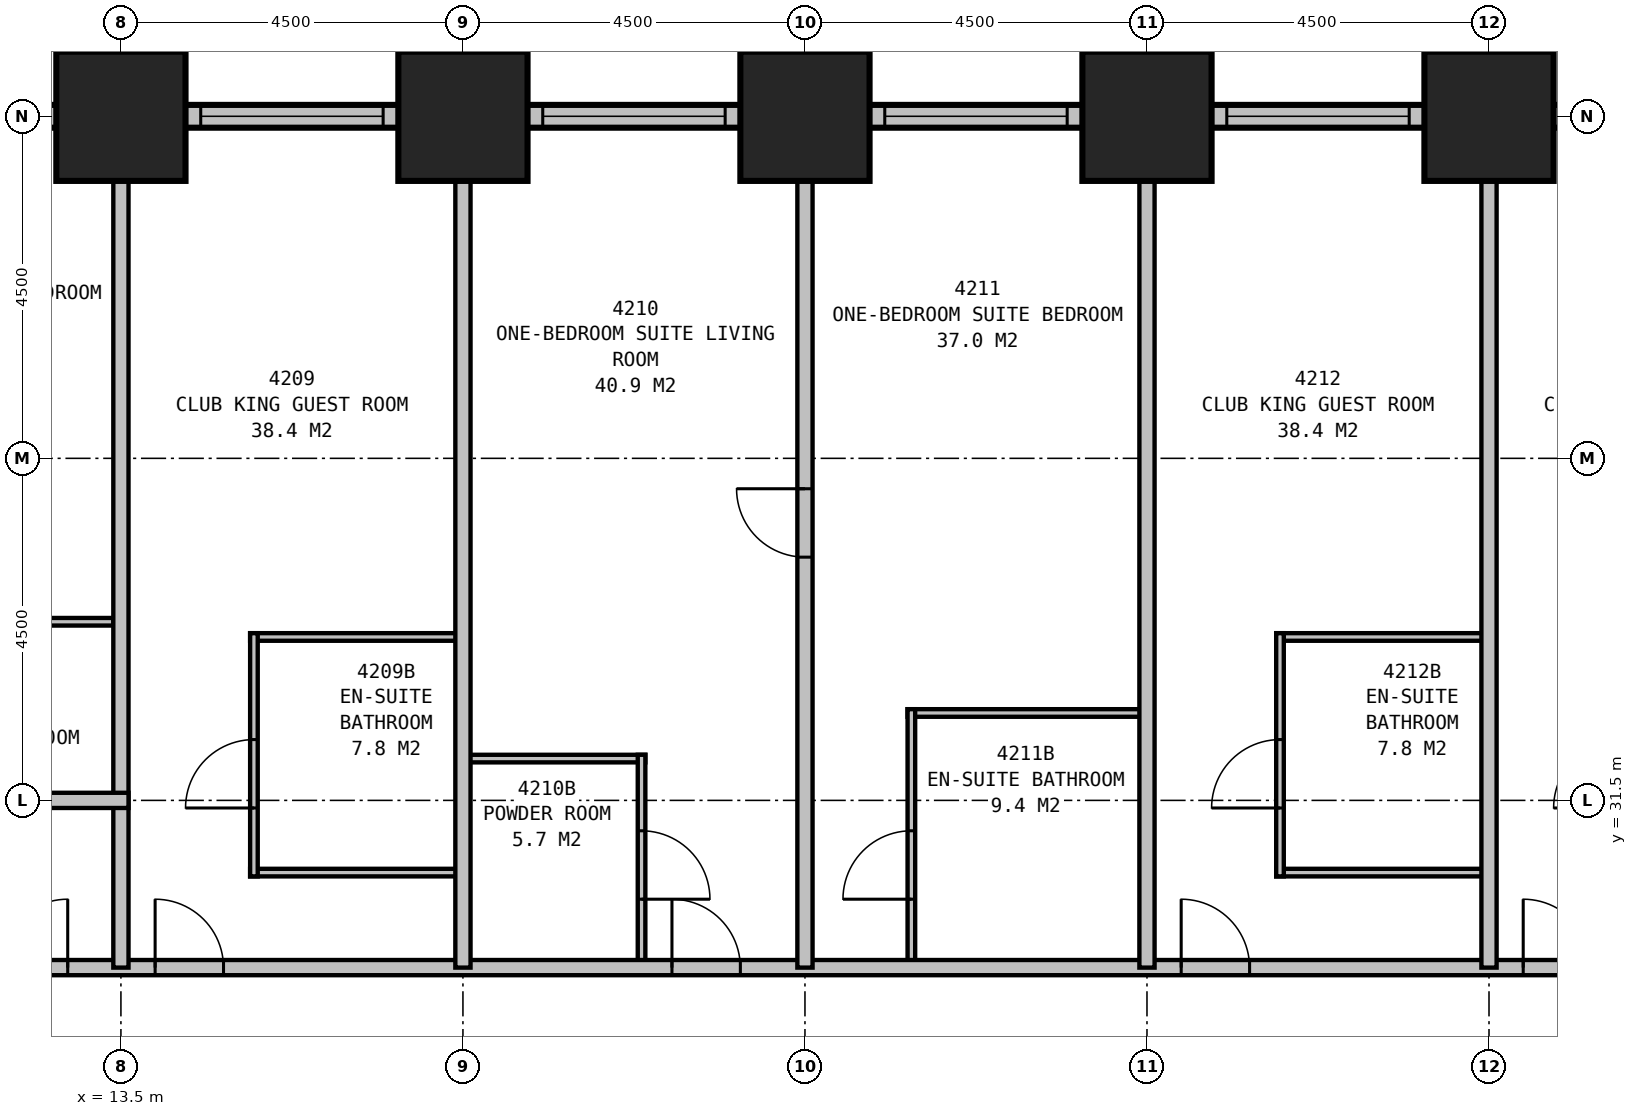
"""IFC4 building model, lengths in metres.
Left out: names, types, materials, properties, quantities, classifications, styles, units other than length and angle.
Written with IfcOpenShell. Run it as: python <this file> out.ifc"""

import sys

from ifc_helpers import new_model, si_unit, direction, frame, frame_2d, origin, origin_2d, place, context, subcontext, project, spatial, rectangle, extrude, element, fill, save


model = new_model("IFC4")
c1 = context("Model", 3, precision=1e-05, world=origin(), true_north=direction((0.0, 1.0)))
c2 = subcontext(c1, "Body", "Model", "MODEL_VIEW")
j1 = project(units=[si_unit("LENGTHUNIT", "METRE"), si_unit("PLANEANGLEUNIT", "RADIAN")], contexts=[c1])
p1 = place(None, origin())
s1 = spatial("IfcSite", under=j1, at=p1, CompositionType="ELEMENT")
p2 = place(p1, origin())
s2 = spatial("IfcBuilding", under=s1, at=p2, CompositionType="ELEMENT")
p3 = place(p2, frame((0.0, 0.0, 165.9)))
s3 = spatial("IfcBuildingStorey", under=s2, at=p3, CompositionType="ELEMENT", Elevation=165.9)
for number, where, z_axis, x_axis in (
    (1, (31.5, 40.5, 0.0), (0.0, 0.0, 1.0), (1.0, 0.0, 0.0)),
    (2, (27.0, 40.5, 0.0), (0.0, 0.0, 1.0), (1.0, 0.0, 0.0)),
    (3, (22.5, 40.5, 0.0), (0.0, 0.0, 1.0), (1.0, 0.0, 0.0)),
    (4, (18.0, 40.5, 0.0), (0.0, 0.0, 1.0), (1.0, 0.0, 0.0)),
    (5, (13.5, 40.5, 0.0), (0.0, 0.0, 1.0), (1.0, 0.0, 0.0)),
):
    element("IfcColumn", number, at=place(p3, frame(where, z_axis=z_axis, x_axis=x_axis)), inside=s3, PredefinedType="COLUMN", context=c2, shape_type="SweptSolid", body=[
        extrude(rectangle(XDim=1.7, YDim=1.7, at=origin_2d()), origin(), (0.0, 0.0, 1.0), 3.5),
    ])
p4 = place(p3, frame((40.65, 40.5, 0.0), z_axis=(0.0, 0.0, 1.0), x_axis=(-1.0, 0.0, 0.0)))
e6 = element("IfcWall", 6, at=p4, inside=s3, PredefinedType="STANDARD", context=c2, shape_type="SweptSolid", body=[
    extrude(rectangle(XDim=31.8, YDim=0.3, at=frame_2d((15.9, 0.0))), origin(), (0.0, 0.0, 1.0), 2.25),
])
p5 = place(p4, frame((1.2, 0.0, 0.5)))
e7 = element("IfcOpeningElement", 7, at=p5, cuts=e6, PredefinedType="OPENING", context=c2, shape_type="SweptSolid", body=[
    extrude(rectangle(XDim=2.4, YDim=1.6, at=frame_2d((1.2, 0.8))), frame((0.0, 0.16, 0.0), z_axis=(0.0, -1.0, 0.0), x_axis=(1.0, 0.0, 0.0)), (0.0, 0.0, 1.0), 0.32),
])
p6 = place(p4, frame((5.7, 0.0, 0.5)))
e8 = element("IfcOpeningElement", 8, at=p6, cuts=e6, PredefinedType="OPENING", context=c2, shape_type="SweptSolid", body=[
    extrude(rectangle(XDim=2.4, YDim=1.6, at=frame_2d((1.2, 0.8))), frame((0.0, 0.16, 0.0), z_axis=(0.0, -1.0, 0.0), x_axis=(1.0, 0.0, 0.0)), (0.0, 0.0, 1.0), 0.32),
])
p7 = place(p4, frame((10.2, 0.0, 0.5)))
e9 = element("IfcOpeningElement", 9, at=p7, cuts=e6, PredefinedType="OPENING", context=c2, shape_type="SweptSolid", body=[
    extrude(rectangle(XDim=2.4, YDim=1.6, at=frame_2d((1.2, 0.8))), frame((0.0, 0.16, 0.0), z_axis=(0.0, -1.0, 0.0), x_axis=(1.0, 0.0, 0.0)), (0.0, 0.0, 1.0), 0.32),
])
p8 = place(p4, frame((14.7, 0.0, 0.5)))
e10 = element("IfcOpeningElement", 10, at=p8, cuts=e6, PredefinedType="OPENING", context=c2, shape_type="SweptSolid", body=[
    extrude(rectangle(XDim=2.4, YDim=1.6, at=frame_2d((1.2, 0.8))), frame((0.0, 0.16, 0.0), z_axis=(0.0, -1.0, 0.0), x_axis=(1.0, 0.0, 0.0)), (0.0, 0.0, 1.0), 0.32),
])
p9 = place(p4, frame((19.2, 0.0, 0.5)))
e11 = element("IfcOpeningElement", 11, at=p9, cuts=e6, PredefinedType="OPENING", context=c2, shape_type="SweptSolid", body=[
    extrude(rectangle(XDim=2.4, YDim=1.6, at=frame_2d((1.2, 0.8))), frame((0.0, 0.16, 0.0), z_axis=(0.0, -1.0, 0.0), x_axis=(1.0, 0.0, 0.0)), (0.0, 0.0, 1.0), 0.32),
])
p10 = place(p4, frame((23.7, 0.0, 0.5)))
e12 = element("IfcOpeningElement", 12, at=p10, cuts=e6, PredefinedType="OPENING", context=c2, shape_type="SweptSolid", body=[
    extrude(rectangle(XDim=2.4, YDim=1.6, at=frame_2d((1.2, 0.8))), frame((0.0, 0.16, 0.0), z_axis=(0.0, -1.0, 0.0), x_axis=(1.0, 0.0, 0.0)), (0.0, 0.0, 1.0), 0.32),
])
p11 = place(p4, frame((28.2, 0.0, 0.5)))
e13 = element("IfcOpeningElement", 13, at=p11, cuts=e6, PredefinedType="OPENING", context=c2, shape_type="SweptSolid", body=[
    extrude(rectangle(XDim=2.4, YDim=1.6, at=frame_2d((1.2, 0.8))), frame((0.0, 0.16, 0.0), z_axis=(0.0, -1.0, 0.0), x_axis=(1.0, 0.0, 0.0)), (0.0, 0.0, 1.0), 0.32),
])
p12 = place(p3, frame((11.2, 29.3, 0.0), z_axis=(0.0, 0.0, 1.0), x_axis=(1.0, 0.0, 0.0)))
e14 = element("IfcWall", 14, at=p12, inside=s3, PredefinedType="PARTITIONING", context=c2, shape_type="SweptSolid", body=[
    extrude(rectangle(XDim=27.1, YDim=0.2, at=frame_2d((13.55, 0.0))), origin(), (0.0, 0.0, 1.0), 3.25),
])
p13 = place(p12, frame((2.75, 0.0, 0.0)))
e15 = element("IfcOpeningElement", 15, at=p13, cuts=e14, PredefinedType="OPENING", context=c2, shape_type="SweptSolid", body=[
    extrude(rectangle(XDim=0.9, YDim=2.1, at=frame_2d((0.45, 1.05))), frame((0.0, 0.11, 0.0), z_axis=(0.0, -1.0, 0.0), x_axis=(1.0, 0.0, 0.0)), (0.0, 0.0, 1.0), 0.22),
])
p14 = place(p12, frame((9.55, 0.0, 0.0)))
e16 = element("IfcOpeningElement", 16, at=p14, cuts=e14, PredefinedType="OPENING", context=c2, shape_type="SweptSolid", body=[
    extrude(rectangle(XDim=0.9, YDim=2.1, at=frame_2d((0.45, 1.05))), frame((0.0, 0.11, 0.0), z_axis=(0.0, -1.0, 0.0), x_axis=(1.0, 0.0, 0.0)), (0.0, 0.0, 1.0), 0.22),
])
p15 = place(p12, frame((16.25, 0.0, 0.0)))
e17 = element("IfcOpeningElement", 17, at=p15, cuts=e14, PredefinedType="OPENING", context=c2, shape_type="SweptSolid", body=[
    extrude(rectangle(XDim=0.9, YDim=2.1, at=frame_2d((0.45, 1.05))), frame((0.0, 0.11, 0.0), z_axis=(0.0, -1.0, 0.0), x_axis=(1.0, 0.0, 0.0)), (0.0, 0.0, 1.0), 0.22),
])
p16 = place(p12, frame((20.75, 0.0, 0.0)))
e18 = element("IfcOpeningElement", 18, at=p16, cuts=e14, PredefinedType="OPENING", context=c2, shape_type="SweptSolid", body=[
    extrude(rectangle(XDim=0.9, YDim=2.1, at=frame_2d((0.45, 1.05))), frame((0.0, 0.11, 0.0), z_axis=(0.0, -1.0, 0.0), x_axis=(1.0, 0.0, 0.0)), (0.0, 0.0, 1.0), 0.22),
])
p17 = place(p12, frame((25.5, 0.0, 0.0)))
e19 = element("IfcOpeningElement", 19, at=p17, cuts=e14, PredefinedType="OPENING", context=c2, shape_type="SweptSolid", body=[
    extrude(rectangle(XDim=0.9, YDim=2.1, at=frame_2d((0.45, 1.05))), frame((0.0, 0.11, 0.0), z_axis=(0.0, -1.0, 0.0), x_axis=(1.0, 0.0, 0.0)), (0.0, 0.0, 1.0), 0.22),
])
p18 = place(p12, frame((0.7, 0.0, 0.0)))
e20 = element("IfcOpeningElement", 20, at=p18, cuts=e14, PredefinedType="OPENING", context=c2, shape_type="SweptSolid", body=[
    extrude(rectangle(XDim=0.9, YDim=2.1, at=frame_2d((0.45, 1.05))), frame((0.0, 0.11, 0.0), z_axis=(0.0, -1.0, 0.0), x_axis=(1.0, 0.0, 0.0)), (0.0, 0.0, 1.0), 0.22),
])
p19 = place(p3, frame((18.0, 29.3, 0.0), z_axis=(0.0, 0.0, 1.0), x_axis=(0.0, 1.0, 0.0)))
e21 = element("IfcWall", 21, at=p19, inside=s3, PredefinedType="PARTITIONING", context=c2, shape_type="SweptSolid", body=[
    extrude(rectangle(XDim=11.2, YDim=0.2, at=frame_2d((5.6, 0.0))), origin(), (0.0, 0.0, 1.0), 2.25),
])
p20 = place(p3, frame((22.5, 29.3, 0.0), z_axis=(0.0, 0.0, 1.0), x_axis=(0.0, 1.0, 0.0)))
e22 = element("IfcWall", 22, at=p20, inside=s3, PredefinedType="PARTITIONING", context=c2, shape_type="SweptSolid", body=[
    extrude(rectangle(XDim=11.2, YDim=0.2, at=frame_2d((5.6, 0.0))), origin(), (0.0, 0.0, 1.0), 2.25),
])
p21 = place(p20, frame((5.4, 0.0, 0.0)))
e23 = element("IfcOpeningElement", 23, at=p21, cuts=e22, PredefinedType="OPENING", context=c2, shape_type="SweptSolid", body=[
    extrude(rectangle(XDim=0.9, YDim=2.1, at=frame_2d((0.45, 1.05))), frame((0.0, 0.11, 0.0), z_axis=(0.0, -1.0, 0.0), x_axis=(1.0, 0.0, 0.0)), (0.0, 0.0, 1.0), 0.22),
])
for number, where, z_axis, x_axis in (
    (24, (27.0, 29.3, 0.0), (0.0, 0.0, 1.0), (0.0, 1.0, 0.0)),
    (25, (31.5, 29.3, 0.0), (0.0, 0.0, 1.0), (0.0, 1.0, 0.0)),
):
    element("IfcWall", number, at=place(p3, frame(where, z_axis=z_axis, x_axis=x_axis)), inside=s3, PredefinedType="PARTITIONING", context=c2, shape_type="SweptSolid", body=[
        extrude(rectangle(XDim=11.2, YDim=0.2, at=frame_2d((5.6, 0.0))), origin(), (0.0, 0.0, 1.0), 2.25),
    ])
for number, where, z_axis, x_axis in (
    (26, (15.2, 30.55, 0.0), (0.0, 0.0, 1.0), (1.0, 0.0, 0.0)),
    (27, (15.2, 33.65, 0.0), (0.0, 0.0, 1.0), (1.0, 0.0, 0.0)),
):
    element("IfcWall", number, at=place(p3, frame(where, z_axis=z_axis, x_axis=x_axis)), inside=s3, PredefinedType="PLUMBINGWALL", context=c2, shape_type="SweptSolid", body=[
        extrude(rectangle(XDim=2.8, YDim=0.1, at=frame_2d((1.4, 0.0))), origin(), (0.0, 0.0, 1.0), 3.25),
    ])
p22 = place(p3, frame((15.25, 30.5, 0.0), z_axis=(0.0, 0.0, 1.0), x_axis=(0.0, 1.0, 0.0)))
e28 = element("IfcWall", 28, at=p22, inside=s3, PredefinedType="PLUMBINGWALL", context=c2, shape_type="SweptSolid", body=[
    extrude(rectangle(XDim=3.2, YDim=0.1, at=frame_2d((1.6, 0.0))), origin(), (0.0, 0.0, 1.0), 3.25),
])
p23 = place(p22, frame((0.9, 0.0, 0.0)))
e29 = element("IfcOpeningElement", 29, at=p23, cuts=e28, PredefinedType="OPENING", context=c2, shape_type="SweptSolid", body=[
    extrude(rectangle(XDim=0.9, YDim=2.1, at=frame_2d((0.45, 1.05))), frame((0.0, 0.06, 0.0), z_axis=(0.0, -1.0, 0.0), x_axis=(1.0, 0.0, 0.0)), (0.0, 0.0, 1.0), 0.12),
])
p24 = place(p3, frame((18.0, 32.05, 0.0), z_axis=(0.0, 0.0, 1.0), x_axis=(1.0, 0.0, 0.0)))
e30 = element("IfcWall", 30, at=p24, inside=s3, PredefinedType="PLUMBINGWALL", context=c2, shape_type="SweptSolid", body=[
    extrude(rectangle(XDim=2.4, YDim=0.1, at=frame_2d((1.2, 0.0))), origin(), (0.0, 0.0, 1.0), 3.25),
])
p25 = place(p3, frame((20.35, 29.3, 0.0), z_axis=(0.0, 0.0, 1.0), x_axis=(0.0, 1.0, 0.0)))
e31 = element("IfcWall", 31, at=p25, inside=s3, PredefinedType="PLUMBINGWALL", context=c2, shape_type="SweptSolid", body=[
    extrude(rectangle(XDim=2.8, YDim=0.1, at=frame_2d((1.4, 0.0))), origin(), (0.0, 0.0, 1.0), 3.25),
])
p26 = place(p25, frame((1.8, 0.0, 0.0), z_axis=(0.0, 0.0, 1.0), x_axis=(-1.0, 0.0, 0.0)))
e32 = element("IfcOpeningElement", 32, at=p26, cuts=e31, PredefinedType="OPENING", context=c2, shape_type="SweptSolid", body=[
    extrude(rectangle(XDim=0.9, YDim=2.1, at=frame_2d((0.45, 1.05))), frame((0.0, 0.06, 0.0), z_axis=(0.0, -1.0, 0.0), x_axis=(1.0, 0.0, 0.0)), (0.0, 0.0, 1.0), 0.12),
])
p27 = place(p3, frame((23.85, 32.65, 0.0), z_axis=(0.0, 0.0, 1.0), x_axis=(1.0, 0.0, 0.0)))
e33 = element("IfcWall", 33, at=p27, inside=s3, PredefinedType="PLUMBINGWALL", context=c2, shape_type="SweptSolid", body=[
    extrude(rectangle(XDim=3.15, YDim=0.1, at=frame_2d((1.575, 0.0))), origin(), (0.0, 0.0, 1.0), 3.25),
])
p28 = place(p3, frame((23.9, 29.3, 0.0), z_axis=(0.0, 0.0, 1.0), x_axis=(0.0, 1.0, 0.0)))
e34 = element("IfcWall", 34, at=p28, inside=s3, PredefinedType="PLUMBINGWALL", context=c2, shape_type="SweptSolid", body=[
    extrude(rectangle(XDim=3.4, YDim=0.1, at=frame_2d((1.7, 0.0))), origin(), (0.0, 0.0, 1.0), 3.25),
])
p29 = place(p28, frame((0.9, 0.0, 0.0)))
e35 = element("IfcOpeningElement", 35, at=p29, cuts=e34, PredefinedType="OPENING", context=c2, shape_type="SweptSolid", body=[
    extrude(rectangle(XDim=0.9, YDim=2.1, at=frame_2d((0.45, 1.05))), frame((0.0, 0.06, 0.0), z_axis=(0.0, -1.0, 0.0), x_axis=(1.0, 0.0, 0.0)), (0.0, 0.0, 1.0), 0.12),
])
for number, where, z_axis, x_axis in (
    (36, (28.7, 30.55, 0.0), (0.0, 0.0, 1.0), (1.0, 0.0, 0.0)),
    (37, (28.7, 33.65, 0.0), (0.0, 0.0, 1.0), (1.0, 0.0, 0.0)),
):
    element("IfcWall", number, at=place(p3, frame(where, z_axis=z_axis, x_axis=x_axis)), inside=s3, PredefinedType="PLUMBINGWALL", context=c2, shape_type="SweptSolid", body=[
        extrude(rectangle(XDim=2.8, YDim=0.1, at=frame_2d((1.4, 0.0))), origin(), (0.0, 0.0, 1.0), 3.25),
    ])
p30 = place(p3, frame((28.75, 30.5, 0.0), z_axis=(0.0, 0.0, 1.0), x_axis=(0.0, 1.0, 0.0)))
e38 = element("IfcWall", 38, at=p30, inside=s3, PredefinedType="PLUMBINGWALL", context=c2, shape_type="SweptSolid", body=[
    extrude(rectangle(XDim=3.2, YDim=0.1, at=frame_2d((1.6, 0.0))), origin(), (0.0, 0.0, 1.0), 3.25),
])
p31 = place(p30, frame((0.9, 0.0, 0.0)))
e39 = element("IfcOpeningElement", 39, at=p31, cuts=e38, PredefinedType="OPENING", context=c2, shape_type="SweptSolid", body=[
    extrude(rectangle(XDim=0.9, YDim=2.1, at=frame_2d((0.45, 1.05))), frame((0.0, 0.06, 0.0), z_axis=(0.0, -1.0, 0.0), x_axis=(1.0, 0.0, 0.0)), (0.0, 0.0, 1.0), 0.12),
])
p32 = place(p3, frame((13.5, 29.3, 0.0), z_axis=(0.0, 0.0, 1.0), x_axis=(0.0, 1.0, 0.0)))
e40 = element("IfcWall", 40, at=p32, inside=s3, PredefinedType="PARTITIONING", context=c2, shape_type="SweptSolid", body=[
    extrude(rectangle(XDim=11.2, YDim=0.2, at=frame_2d((5.6, 0.0))), origin(), (0.0, 0.0, 1.0), 2.25),
])
p33 = place(p3, frame((13.6, 31.5, 0.0), z_axis=(0.0, 0.0, 1.0), x_axis=(-1.0, 0.0, 0.0)))
e41 = element("IfcWall", 41, at=p33, inside=s3, PredefinedType="PARTITIONING", context=c2, shape_type="SweptSolid", body=[
    extrude(rectangle(XDim=10.099, YDim=0.2, at=frame_2d((5.05, 0.0))), origin(), (0.0, 0.0, 1.0), 3.25),
])
p34 = place(p33, frame((8.999, 0.0, 0.0), z_axis=(0.0, 0.0, 1.0), x_axis=(-1.0, 0.0, 0.0)))
e42 = element("IfcOpeningElement", 42, at=p34, cuts=e41, PredefinedType="OPENING", context=c2, shape_type="SweptSolid", body=[
    extrude(rectangle(XDim=0.9, YDim=2.1, at=frame_2d((0.45, 1.05))), frame((0.0, 0.11, 0.0), z_axis=(0.0, -1.0, 0.0), x_axis=(1.0, 0.0, 0.0)), (0.0, 0.0, 1.0), 0.22),
])
p35 = place(p3, frame((13.4, 33.85, 0.0), z_axis=(0.0, 0.0, 1.0), x_axis=(-1.0, 0.0, 0.0)))
e43 = element("IfcWall", 43, at=p35, inside=s3, PredefinedType="PLUMBINGWALL", context=c2, shape_type="SweptSolid", body=[
    extrude(rectangle(XDim=3.3, YDim=0.1, at=frame_2d((1.65, 0.0))), origin(), (0.0, 0.0, 1.0), 3.25),
])
p36 = place(p35, frame((1.8, 0.0, 0.0), z_axis=(0.0, 0.0, 1.0), x_axis=(-1.0, 0.0, 0.0)))
e44 = element("IfcOpeningElement", 44, at=p36, cuts=e43, PredefinedType="OPENING", context=c2, shape_type="SweptSolid", body=[
    extrude(rectangle(XDim=0.9, YDim=2.1, at=frame_2d((0.45, 1.05))), frame((0.0, 0.06, 0.0), z_axis=(0.0, -1.0, 0.0), x_axis=(1.0, 0.0, 0.0)), (0.0, 0.0, 1.0), 0.12),
])
p37 = place(p7, origin())
e45 = element("IfcWindow", 45, at=p37, inside=s3, PartitioningType="SINGLE_PANEL", PredefinedType="WINDOW", context=c2, shape_type="SweptSolid", body=[
    extrude(rectangle(XDim=2.4, YDim=1.6, at=frame_2d((1.2, 0.8))), frame((0.0, 0.03, 0.0), z_axis=(0.0, -1.0, 0.0), x_axis=(1.0, 0.0, 0.0)), (0.0, 0.0, 1.0), 0.06),
])
fill(e9, e45)
p38 = place(p8, origin())
e46 = element("IfcWindow", 46, at=p38, inside=s3, PartitioningType="SINGLE_PANEL", PredefinedType="WINDOW", context=c2, shape_type="SweptSolid", body=[
    extrude(rectangle(XDim=2.4, YDim=1.6, at=frame_2d((1.2, 0.8))), frame((0.0, 0.03, 0.0), z_axis=(0.0, -1.0, 0.0), x_axis=(1.0, 0.0, 0.0)), (0.0, 0.0, 1.0), 0.06),
])
fill(e10, e46)
p39 = place(p9, origin())
e47 = element("IfcWindow", 47, at=p39, inside=s3, PartitioningType="SINGLE_PANEL", PredefinedType="WINDOW", context=c2, shape_type="SweptSolid", body=[
    extrude(rectangle(XDim=2.4, YDim=1.6, at=frame_2d((1.2, 0.8))), frame((0.0, 0.03, 0.0), z_axis=(0.0, -1.0, 0.0), x_axis=(1.0, 0.0, 0.0)), (0.0, 0.0, 1.0), 0.06),
])
fill(e11, e47)
p40 = place(p10, origin())
e48 = element("IfcWindow", 48, at=p40, inside=s3, PartitioningType="SINGLE_PANEL", PredefinedType="WINDOW", context=c2, shape_type="SweptSolid", body=[
    extrude(rectangle(XDim=2.4, YDim=1.6, at=frame_2d((1.2, 0.8))), frame((0.0, 0.03, 0.0), z_axis=(0.0, -1.0, 0.0), x_axis=(1.0, 0.0, 0.0)), (0.0, 0.0, 1.0), 0.06),
])
fill(e12, e48)
p41 = place(p13, origin())
e49 = element("IfcDoor", 49, at=p41, inside=s3, OperationType="SINGLE_SWING_LEFT", PredefinedType="DOOR", context=c2, shape_type="SweptSolid", body=[
    extrude(rectangle(XDim=0.9, YDim=2.1, at=frame_2d((0.45, 1.05))), frame((0.0, 0.025, 0.0), z_axis=(0.0, -1.0, 0.0), x_axis=(1.0, 0.0, 0.0)), (0.0, 0.0, 1.0), 0.05),
])
fill(e15, e49)
p42 = place(p14, origin())
e50 = element("IfcDoor", 50, at=p42, inside=s3, OperationType="SINGLE_SWING_LEFT", PredefinedType="DOOR", context=c2, shape_type="SweptSolid", body=[
    extrude(rectangle(XDim=0.9, YDim=2.1, at=frame_2d((0.45, 1.05))), frame((0.0, 0.025, 0.0), z_axis=(0.0, -1.0, 0.0), x_axis=(1.0, 0.0, 0.0)), (0.0, 0.0, 1.0), 0.05),
])
fill(e16, e50)
p43 = place(p15, origin())
e51 = element("IfcDoor", 51, at=p43, inside=s3, OperationType="SINGLE_SWING_LEFT", PredefinedType="DOOR", context=c2, shape_type="SweptSolid", body=[
    extrude(rectangle(XDim=0.9, YDim=2.1, at=frame_2d((0.45, 1.05))), frame((0.0, 0.025, 0.0), z_axis=(0.0, -1.0, 0.0), x_axis=(1.0, 0.0, 0.0)), (0.0, 0.0, 1.0), 0.05),
])
fill(e17, e51)
p44 = place(p16, origin())
e52 = element("IfcDoor", 52, at=p44, inside=s3, OperationType="SINGLE_SWING_LEFT", PredefinedType="DOOR", context=c2, shape_type="SweptSolid", body=[
    extrude(rectangle(XDim=0.9, YDim=2.1, at=frame_2d((0.45, 1.05))), frame((0.0, 0.025, 0.0), z_axis=(0.0, -1.0, 0.0), x_axis=(1.0, 0.0, 0.0)), (0.0, 0.0, 1.0), 0.05),
])
fill(e18, e52)
p45 = place(p18, origin())
e53 = element("IfcDoor", 53, at=p45, inside=s3, OperationType="SINGLE_SWING_RIGHT", PredefinedType="DOOR", context=c2, shape_type="SweptSolid", body=[
    extrude(rectangle(XDim=0.9, YDim=2.1, at=frame_2d((0.45, 1.05))), frame((0.0, 0.025, 0.0), z_axis=(0.0, -1.0, 0.0), x_axis=(1.0, 0.0, 0.0)), (0.0, 0.0, 1.0), 0.05),
])
fill(e20, e53)
p46 = place(p21, origin())
e54 = element("IfcDoor", 54, at=p46, inside=s3, OperationType="SINGLE_SWING_RIGHT", PredefinedType="DOOR", context=c2, shape_type="SweptSolid", body=[
    extrude(rectangle(XDim=0.9, YDim=2.1, at=frame_2d((0.45, 1.05))), frame((0.0, 0.025, 0.0), z_axis=(0.0, -1.0, 0.0), x_axis=(1.0, 0.0, 0.0)), (0.0, 0.0, 1.0), 0.05),
])
fill(e23, e54)
p47 = place(p23, origin())
e55 = element("IfcDoor", 55, at=p47, inside=s3, OperationType="SINGLE_SWING_LEFT", PredefinedType="DOOR", context=c2, shape_type="SweptSolid", body=[
    extrude(rectangle(XDim=0.9, YDim=2.1, at=frame_2d((0.45, 1.05))), frame((0.0, 0.025, 0.0), z_axis=(0.0, -1.0, 0.0), x_axis=(1.0, 0.0, 0.0)), (0.0, 0.0, 1.0), 0.05),
])
fill(e29, e55)
p48 = place(p26, origin())
e56 = element("IfcDoor", 56, at=p48, inside=s3, OperationType="SINGLE_SWING_RIGHT", PredefinedType="DOOR", context=c2, shape_type="SweptSolid", body=[
    extrude(rectangle(XDim=0.9, YDim=2.1, at=frame_2d((0.45, 1.05))), frame((0.0, 0.025, 0.0), z_axis=(0.0, -1.0, 0.0), x_axis=(1.0, 0.0, 0.0)), (0.0, 0.0, 1.0), 0.05),
])
fill(e32, e56)
p49 = place(p29, origin())
e57 = element("IfcDoor", 57, at=p49, inside=s3, OperationType="SINGLE_SWING_LEFT", PredefinedType="DOOR", context=c2, shape_type="SweptSolid", body=[
    extrude(rectangle(XDim=0.9, YDim=2.1, at=frame_2d((0.45, 1.05))), frame((0.0, 0.025, 0.0), z_axis=(0.0, -1.0, 0.0), x_axis=(1.0, 0.0, 0.0)), (0.0, 0.0, 1.0), 0.05),
])
fill(e35, e57)
p50 = place(p31, origin())
e58 = element("IfcDoor", 58, at=p50, inside=s3, OperationType="SINGLE_SWING_LEFT", PredefinedType="DOOR", context=c2, shape_type="SweptSolid", body=[
    extrude(rectangle(XDim=0.9, YDim=2.1, at=frame_2d((0.45, 1.05))), frame((0.0, 0.025, 0.0), z_axis=(0.0, -1.0, 0.0), x_axis=(1.0, 0.0, 0.0)), (0.0, 0.0, 1.0), 0.05),
])
fill(e39, e58)
save(model, sys.argv[1])
